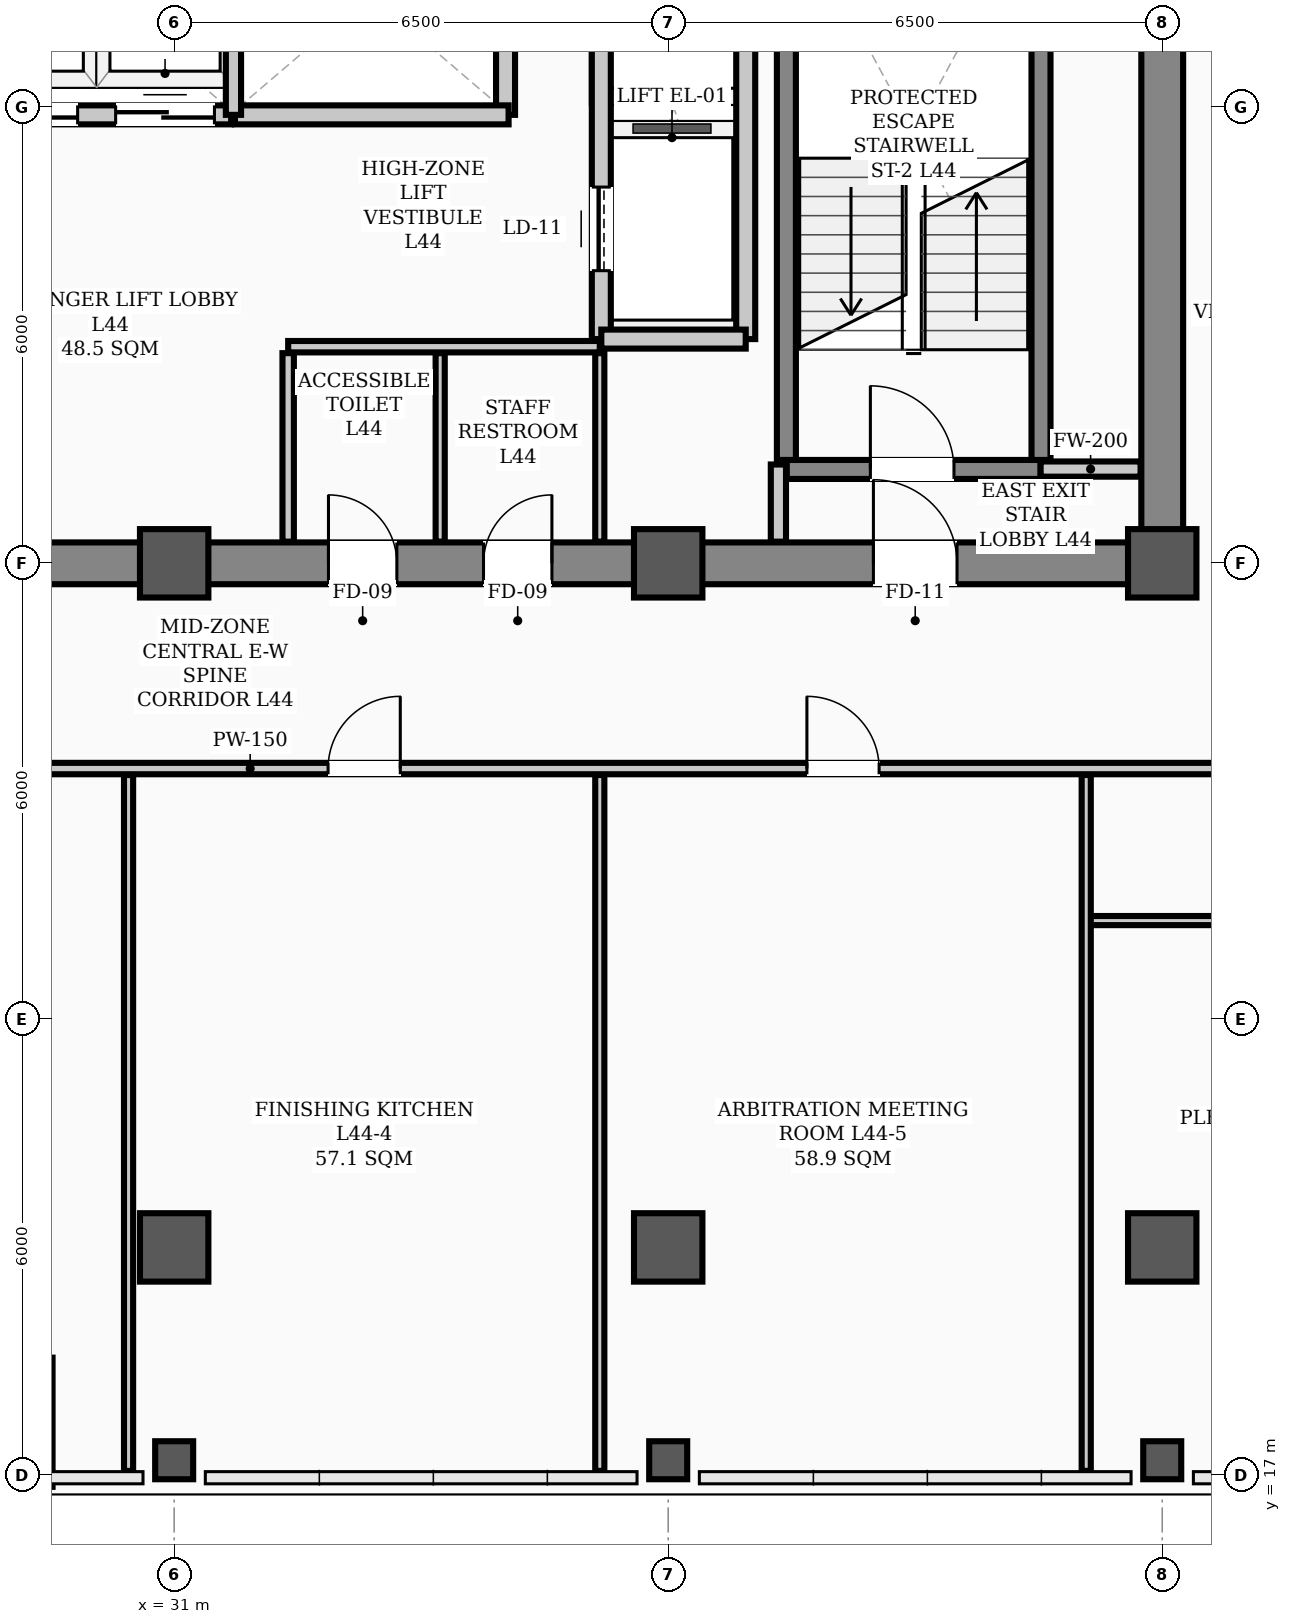
"""IFC4 building model, lengths in metres.
Left out: names, types, materials, properties, quantities, classifications, styles, units other than length and angle.
Written with IfcOpenShell. Run it as: python <this file> out.ifc"""

import sys

from ifc_helpers import new_model, si_unit, direction, frame, frame_2d, origin, origin_2d, place, context, subcontext, project, spatial, rectangle, hollow_rectangle, extrude, element, fill, save


model = new_model("IFC4")
c1 = context("Model", 3, precision=1e-05, world=origin(), true_north=direction((0.0, 1.0)))
c2 = subcontext(c1, "Body", "Model", "MODEL_VIEW")
j1 = project(units=[si_unit("LENGTHUNIT", "METRE"), si_unit("PLANEANGLEUNIT", "RADIAN")], contexts=[c1])
p1 = place(None, origin())
s1 = spatial("IfcSite", under=j1, at=p1, CompositionType="ELEMENT")
p2 = place(p1, origin())
s2 = spatial("IfcBuilding", under=s1, at=p2, CompositionType="ELEMENT")
p3 = place(p2, frame((0.0, 0.0, 177.3)))
s3 = spatial("IfcBuildingStorey", under=s2, at=p3, CompositionType="ELEMENT", Elevation=177.3)
for number, where, z_axis, x_axis in (
    (1, (31.0, 29.0, 0.0), (0.0, 0.0, 1.0), (1.0, 0.0, 0.0)),
    (2, (37.5, 29.0, 0.0), (0.0, 0.0, 1.0), (1.0, 0.0, 0.0)),
    (3, (44.0, 29.0, 0.0), (0.0, 0.0, 1.0), (1.0, 0.0, 0.0)),
    (4, (31.0, 20.0, 0.0), (0.0, 0.0, 1.0), (1.0, 0.0, 0.0)),
    (5, (37.5, 20.0, 0.0), (0.0, 0.0, 1.0), (1.0, 0.0, 0.0)),
    (6, (44.0, 20.0, 0.0), (0.0, 0.0, 1.0), (1.0, 0.0, 0.0)),
):
    element("IfcColumn", number, at=place(p3, frame(where, z_axis=z_axis, x_axis=x_axis)), inside=s3, PredefinedType="COLUMN", context=c2, shape_type="SweptSolid", body=[
        extrude(hollow_rectangle(XDim=0.9, YDim=0.9, WallThickness=0.035, InnerFilletRadius=0.017, OuterFilletRadius=0.052, at=origin_2d()), origin(), (0.0, 0.0, 1.0), 3.9),
    ])
for number, where, z_axis, x_axis in (
    (7, (31.0, 17.2, 0.0), (0.0, 0.0, 1.0), (1.0, 0.0, 0.0)),
    (8, (37.5, 17.2, 0.0), (0.0, 0.0, 1.0), (1.0, 0.0, 0.0)),
    (9, (44.0, 17.2, 0.0), (0.0, 0.0, 1.0), (1.0, 0.0, 0.0)),
):
    element("IfcColumn", number, at=place(p3, frame(where, z_axis=z_axis, x_axis=x_axis)), inside=s3, PredefinedType="COLUMN", context=c2, shape_type="SweptSolid", body=[
        extrude(hollow_rectangle(XDim=0.5, YDim=0.5, WallThickness=0.024, InnerFilletRadius=0.012, OuterFilletRadius=0.036, at=origin_2d()), origin(), (0.0, 0.0, 1.0), 3.9),
    ])
p4 = place(p3, frame((29.3, 18.55, 0.0), z_axis=(0.0, 0.0, 1.0), x_axis=(0.0, -1.0, 0.0)))
e10 = element("IfcWall", 10, at=p4, inside=s3, PredefinedType="PARAPET", context=c2, shape_type="SweptSolid", body=[
    extrude(rectangle(XDim=1.7, YDim=0.2, at=frame_2d((0.85, 0.0))), origin(), (0.0, 0.0, 1.0), 1.2),
])
p5 = place(p3, frame((13.5, 29.0, 0.0), z_axis=(0.0, 0.0, 1.0), x_axis=(1.0, 0.0, 0.0)))
e11 = element("IfcWall", 11, at=p5, inside=s3, PredefinedType="SHEAR", context=c2, shape_type="SweptSolid", body=[
    extrude(rectangle(XDim=30.5, YDim=0.55, at=frame_2d((15.25, 0.0))), origin(), (0.0, 0.0, 1.0), 3.72),
])
p6 = place(p5, frame((1.75, 0.0, 0.0)))
e12 = element("IfcOpeningElement", 12, at=p6, cuts=e11, PredefinedType="OPENING", context=c2, shape_type="SweptSolid", body=[
    extrude(rectangle(XDim=1.1, YDim=2.08, at=frame_2d((0.55, 1.04))), frame((0.0, 0.285, 0.0), z_axis=(0.0, -1.0, 0.0), x_axis=(1.0, 0.0, 0.0)), (0.0, 0.0, 1.0), 0.57),
])
p7 = place(p5, frame((26.7, 0.0, 0.0)))
e13 = element("IfcOpeningElement", 13, at=p7, cuts=e11, PredefinedType="OPENING", context=c2, shape_type="SweptSolid", body=[
    extrude(rectangle(XDim=1.1, YDim=2.08, at=frame_2d((0.55, 1.04))), frame((0.0, 0.285, 0.0), z_axis=(0.0, -1.0, 0.0), x_axis=(1.0, 0.0, 0.0)), (0.0, 0.0, 1.0), 0.57),
])
p8 = place(p5, frame((6.8, 0.0, 0.0)))
e14 = element("IfcOpeningElement", 14, at=p8, cuts=e11, PredefinedType="OPENING", context=c2, shape_type="SweptSolid", body=[
    extrude(rectangle(XDim=1.1, YDim=2.08, at=frame_2d((0.55, 1.04))), frame((0.0, 0.285, 0.0), z_axis=(0.0, -1.0, 0.0), x_axis=(1.0, 0.0, 0.0)), (0.0, 0.0, 1.0), 0.57),
])
p9 = place(p5, frame((13.2, 0.0, 0.0)))
e15 = element("IfcOpeningElement", 15, at=p9, cuts=e11, PredefinedType="OPENING", context=c2, shape_type="SweptSolid", body=[
    extrude(rectangle(XDim=1.6, YDim=2.08, at=frame_2d((0.8, 1.04))), frame((0.0, 0.285, 0.0), z_axis=(0.0, -1.0, 0.0), x_axis=(1.0, 0.0, 0.0)), (0.0, 0.0, 1.0), 0.57),
])
p10 = place(p5, frame((19.53, 0.0, 0.0)))
e16 = element("IfcOpeningElement", 16, at=p10, cuts=e11, PredefinedType="OPENING", context=c2, shape_type="SweptSolid", body=[
    extrude(rectangle(XDim=0.9, YDim=2.08, at=frame_2d((0.45, 1.04))), frame((0.0, 0.285, 0.0), z_axis=(0.0, -1.0, 0.0), x_axis=(1.0, 0.0, 0.0)), (0.0, 0.0, 1.0), 0.57),
])
p11 = place(p5, frame((21.57, 0.0, 0.0)))
e17 = element("IfcOpeningElement", 17, at=p11, cuts=e11, PredefinedType="OPENING", context=c2, shape_type="SweptSolid", body=[
    extrude(rectangle(XDim=0.9, YDim=2.08, at=frame_2d((0.45, 1.04))), frame((0.0, 0.285, 0.0), z_axis=(0.0, -1.0, 0.0), x_axis=(1.0, 0.0, 0.0)), (0.0, 0.0, 1.0), 0.57),
])
p12 = place(p3, frame((44.0, 29.35, 0.0), z_axis=(0.0, 0.0, 1.0), x_axis=(0.0, 1.0, 0.0)))
e18 = element("IfcWall", 18, at=p12, inside=s3, PredefinedType="SHEAR", context=c2, shape_type="SweptSolid", body=[
    extrude(rectangle(XDim=8.6, YDim=0.55, at=frame_2d((4.3, 0.0))), origin(), (0.0, 0.0, 1.0), 3.72),
])
p13 = place(p3, frame((39.06, 30.235, 0.0), z_axis=(0.0, 0.0, 1.0), x_axis=(1.0, 0.0, 0.0)))
e19 = element("IfcWall", 19, at=p13, inside=s3, PredefinedType="STANDARD", context=c2, shape_type="SweptSolid", body=[
    extrude(rectangle(XDim=3.34, YDim=0.25, at=frame_2d((1.67, 0.0))), origin(), (0.0, 0.0, 1.0), 3.72),
])
p14 = place(p13, frame((1.1, 0.0, 0.0)))
e20 = element("IfcOpeningElement", 20, at=p14, cuts=e19, PredefinedType="OPENING", context=c2, shape_type="SweptSolid", body=[
    extrude(rectangle(XDim=1.1, YDim=2.08, at=frame_2d((0.55, 1.04))), frame((0.0, 0.135, 0.0), z_axis=(0.0, -1.0, 0.0), x_axis=(1.0, 0.0, 0.0)), (0.0, 0.0, 1.0), 0.27),
])
for number, where, z_axis, x_axis in (
    (21, (39.055, 30.36, 0.0), (0.0, 0.0, 1.0), (0.0, 1.0, 0.0)),
    (22, (42.405, 30.36, 0.0), (0.0, 0.0, 1.0), (0.0, 1.0, 0.0)),
):
    element("IfcWall", number, at=place(p3, frame(where, z_axis=z_axis, x_axis=x_axis)), inside=s3, PredefinedType="STANDARD", context=c2, shape_type="SweptSolid", body=[
        extrude(rectangle(XDim=7.184, YDim=0.25, at=frame_2d((3.592, 0.0))), origin(), (0.0, 0.0, 1.0), 3.72),
    ])
p15 = place(p3, frame((36.62, 31.95, 0.0), z_axis=(0.0, 0.0, 1.0), x_axis=(0.0, 1.0, 0.0)))
e23 = element("IfcWall", 23, at=p15, inside=s3, PredefinedType="STANDARD", context=c2, shape_type="SweptSolid", body=[
    extrude(rectangle(XDim=6.0, YDim=0.25, at=frame_2d((3.0, 0.0))), origin(), (0.0, 0.0, 1.0), 3.35),
])
p16 = place(p15, frame((0.9, 0.0, 0.0)))
e24 = element("IfcOpeningElement", 24, at=p16, cuts=e23, PredefinedType="OPENING", context=c2, shape_type="SweptSolid", body=[
    extrude(rectangle(XDim=1.1, YDim=2.08, at=frame_2d((0.55, 1.04))), frame((0.0, 0.135, 0.0), z_axis=(0.0, -1.0, 0.0), x_axis=(1.0, 0.0, 0.0)), (0.0, 0.0, 1.0), 0.27),
])
p17 = place(p15, frame((4.0, 0.0, 0.0)))
e25 = element("IfcOpeningElement", 25, at=p17, cuts=e23, PredefinedType="OPENING", context=c2, shape_type="SweptSolid", body=[
    extrude(rectangle(XDim=1.1, YDim=2.08, at=frame_2d((0.55, 1.04))), frame((0.0, 0.135, 0.0), z_axis=(0.0, -1.0, 0.0), x_axis=(1.0, 0.0, 0.0)), (0.0, 0.0, 1.0), 0.27),
])
p18 = place(p3, frame((38.52, 31.95, 0.0), z_axis=(0.0, 0.0, 1.0), x_axis=(0.0, 1.0, 0.0)))
e26 = element("IfcWall", 26, at=p18, inside=s3, PredefinedType="STANDARD", context=c2, shape_type="SweptSolid", body=[
    extrude(rectangle(XDim=6.0, YDim=0.25, at=frame_2d((3.0, 0.0))), origin(), (0.0, 0.0, 1.0), 3.35),
])
p19 = place(p3, frame((36.62, 31.95, 0.0), z_axis=(0.0, 0.0, 1.0), x_axis=(1.0, 0.0, 0.0)))
e27 = element("IfcWall", 27, at=p19, inside=s3, PredefinedType="STANDARD", context=c2, shape_type="SweptSolid", body=[
    extrude(rectangle(XDim=1.9, YDim=0.25, at=frame_2d((0.95, 0.0))), origin(), (0.0, 0.0, 1.0), 3.48),
])
p20 = place(p3, frame((35.36, 34.9, 0.0), z_axis=(0.0, 0.0, 1.0), x_axis=(0.0, 1.0, 0.0)))
e28 = element("IfcWall", 28, at=p20, inside=s3, PredefinedType="STANDARD", context=c2, shape_type="SweptSolid", body=[
    extrude(rectangle(XDim=3.05, YDim=0.25, at=frame_2d((1.525, 0.0))), origin(), (0.0, 0.0, 1.0), 3.35),
])
p21 = place(p3, frame((28.2, 34.9, 0.0), z_axis=(0.0, 0.0, 1.0), x_axis=(1.0, 0.0, 0.0)))
e29 = element("IfcWall", 29, at=p21, inside=s3, PredefinedType="STANDARD", context=c2, shape_type="SweptSolid", body=[
    extrude(rectangle(XDim=3.55, YDim=0.25, at=frame_2d((1.775, 0.0))), origin(), (0.0, 0.0, 1.0), 3.72),
])
p22 = place(p21, frame((0.23, 0.0, 0.0)))
e30 = element("IfcOpeningElement", 30, at=p22, cuts=e29, PredefinedType="OPENING", context=c2, shape_type="SweptSolid", body=[
    extrude(rectangle(XDim=1.3, YDim=2.08, at=frame_2d((0.65, 1.04))), frame((0.0, 0.135, 0.0), z_axis=(0.0, -1.0, 0.0), x_axis=(1.0, 0.0, 0.0)), (0.0, 0.0, 1.0), 0.27),
])
p23 = place(p21, frame((2.03, 0.0, 0.0)))
e31 = element("IfcOpeningElement", 31, at=p23, cuts=e29, PredefinedType="OPENING", context=c2, shape_type="SweptSolid", body=[
    extrude(rectangle(XDim=1.3, YDim=2.08, at=frame_2d((0.65, 1.04))), frame((0.0, 0.135, 0.0), z_axis=(0.0, -1.0, 0.0), x_axis=(1.0, 0.0, 0.0)), (0.0, 0.0, 1.0), 0.27),
])
p24 = place(p3, frame((31.8, 34.9, 0.0), z_axis=(0.0, 0.0, 1.0), x_axis=(1.0, 0.0, 0.0)))
e32 = element("IfcWall", 32, at=p24, inside=s3, PredefinedType="STANDARD", context=c2, shape_type="SweptSolid", body=[
    extrude(rectangle(XDim=3.6, YDim=0.25, at=frame_2d((1.8, 0.0))), origin(), (0.0, 0.0, 1.0), 3.72),
])
p25 = place(p3, frame((42.4, 30.24, 0.0), z_axis=(0.0, 0.0, 1.0), x_axis=(1.0, 0.0, 0.0)))
e33 = element("IfcWall", 33, at=p25, inside=s3, PredefinedType="STANDARD", context=c2, shape_type="SweptSolid", body=[
    extrude(rectangle(XDim=1.315, YDim=0.2, at=frame_2d((0.658, 0.0))), origin(), (0.0, 0.0, 1.0), 3.2),
])
p26 = place(p3, frame((32.5, 31.85, 0.0), z_axis=(0.0, 0.0, 1.0), x_axis=(1.0, 0.0, 0.0)))
e34 = element("IfcWall", 34, at=p26, inside=s3, PredefinedType="PARTITIONING", context=c2, shape_type="SweptSolid", body=[
    extrude(rectangle(XDim=4.1, YDim=0.15, at=frame_2d((2.05, 0.0))), origin(), (0.0, 0.0, 1.0), 3.72),
])
p27 = place(p3, frame((10.31, 26.3, 0.0), z_axis=(0.0, 0.0, 1.0), x_axis=(1.0, 0.0, 0.0)))
e35 = element("IfcWall", 35, at=p27, inside=s3, PredefinedType="PARTITIONING", context=c2, shape_type="SweptSolid", body=[
    extrude(rectangle(XDim=43.38, YDim=0.15, at=frame_2d((21.69, 0.0))), origin(), (0.0, 0.0, 1.0), 3.2),
])
p28 = place(p27, frame((0.575, 0.0, 0.0)))
e36 = element("IfcOpeningElement", 36, at=p28, cuts=e35, PredefinedType="OPENING", context=c2, shape_type="SweptSolid", body=[
    extrude(rectangle(XDim=0.95, YDim=2.08, at=frame_2d((0.475, 1.04))), frame((0.0, 0.085, 0.0), z_axis=(0.0, -1.0, 0.0), x_axis=(1.0, 0.0, 0.0)), (0.0, 0.0, 1.0), 0.17),
])
p29 = place(p27, frame((9.415, 0.0, 0.0)))
e37 = element("IfcOpeningElement", 37, at=p29, cuts=e35, PredefinedType="OPENING", context=c2, shape_type="SweptSolid", body=[
    extrude(rectangle(XDim=0.95, YDim=2.08, at=frame_2d((0.475, 1.04))), frame((0.0, 0.085, 0.0), z_axis=(0.0, -1.0, 0.0), x_axis=(1.0, 0.0, 0.0)), (0.0, 0.0, 1.0), 0.17),
])
p30 = place(p27, frame((16.115, 0.0, 0.0)))
e38 = element("IfcOpeningElement", 38, at=p30, cuts=e35, PredefinedType="OPENING", context=c2, shape_type="SweptSolid", body=[
    extrude(rectangle(XDim=0.95, YDim=2.08, at=frame_2d((0.475, 1.04))), frame((0.0, 0.085, 0.0), z_axis=(0.0, -1.0, 0.0), x_axis=(1.0, 0.0, 0.0)), (0.0, 0.0, 1.0), 0.17),
])
p31 = place(p27, frame((22.715, 0.0, 0.0)))
e39 = element("IfcOpeningElement", 39, at=p31, cuts=e35, PredefinedType="OPENING", context=c2, shape_type="SweptSolid", body=[
    extrude(rectangle(XDim=0.95, YDim=2.08, at=frame_2d((0.475, 1.04))), frame((0.0, 0.085, 0.0), z_axis=(0.0, -1.0, 0.0), x_axis=(1.0, 0.0, 0.0)), (0.0, 0.0, 1.0), 0.17),
])
p32 = place(p27, frame((29.015, 0.0, 0.0)))
e40 = element("IfcOpeningElement", 40, at=p32, cuts=e35, PredefinedType="OPENING", context=c2, shape_type="SweptSolid", body=[
    extrude(rectangle(XDim=0.95, YDim=2.08, at=frame_2d((0.475, 1.04))), frame((0.0, 0.085, 0.0), z_axis=(0.0, -1.0, 0.0), x_axis=(1.0, 0.0, 0.0)), (0.0, 0.0, 1.0), 0.17),
])
p33 = place(p27, frame((34.79, 0.0, 0.0)))
e41 = element("IfcOpeningElement", 41, at=p33, cuts=e35, PredefinedType="OPENING", context=c2, shape_type="SweptSolid", body=[
    extrude(rectangle(XDim=0.95, YDim=2.08, at=frame_2d((0.475, 1.04))), frame((0.0, 0.085, 0.0), z_axis=(0.0, -1.0, 0.0), x_axis=(1.0, 0.0, 0.0)), (0.0, 0.0, 1.0), 0.17),
])
p34 = place(p3, frame((43.0, 24.3, 0.0), z_axis=(0.0, 0.0, 1.0), x_axis=(1.0, 0.0, 0.0)))
e42 = element("IfcWall", 42, at=p34, inside=s3, PredefinedType="PARTITIONING", context=c2, shape_type="SweptSolid", body=[
    extrude(rectangle(XDim=10.69, YDim=0.12, at=frame_2d((5.345, 0.0))), origin(), (0.0, 0.0, 1.0), 3.2),
])
p35 = place(p34, frame((4.87, 0.0, 0.0)))
e43 = element("IfcOpeningElement", 43, at=p35, cuts=e42, PredefinedType="OPENING", context=c2, shape_type="SweptSolid", body=[
    extrude(rectangle(XDim=0.95, YDim=2.08, at=frame_2d((0.475, 1.04))), frame((0.0, 0.07, 0.0), z_axis=(0.0, -1.0, 0.0), x_axis=(1.0, 0.0, 0.0)), (0.0, 0.0, 1.0), 0.14),
])
p36 = place(p3, frame((38.95, 29.285, 0.0), z_axis=(0.0, 0.0, 1.0), x_axis=(0.0, 1.0, 0.0)))
e44 = element("IfcWall", 44, at=p36, inside=s3, PredefinedType="STANDARD", context=c2, shape_type="SweptSolid", body=[
    extrude(rectangle(XDim=1.015, YDim=0.2, at=frame_2d((0.508, 0.0))), origin(), (0.0, 0.0, 1.0), 3.35),
])
p37 = place(p3, frame((32.5, 29.285, 0.0), z_axis=(0.0, 0.0, 1.0), x_axis=(0.0, 1.0, 0.0)))
e45 = element("IfcWall", 45, at=p37, inside=s3, PredefinedType="PARTITIONING", context=c2, shape_type="SweptSolid", body=[
    extrude(rectangle(XDim=2.48, YDim=0.15, at=frame_2d((1.24, 0.0))), origin(), (0.0, 0.0, 1.0), 3.35),
])
for number, where, z_axis, x_axis in (
    (46, (36.6, 29.285, 0.0), (0.0, 0.0, 1.0), (0.0, 1.0, 0.0)),
    (47, (34.5, 29.285, 0.0), (0.0, 0.0, 1.0), (0.0, 1.0, 0.0)),
):
    element("IfcWall", number, at=place(p3, frame(where, z_axis=z_axis, x_axis=x_axis)), inside=s3, PredefinedType="PARTITIONING", context=c2, shape_type="SweptSolid", body=[
        extrude(rectangle(XDim=2.48, YDim=0.12, at=frame_2d((1.24, 0.0))), origin(), (0.0, 0.0, 1.0), 3.35),
    ])
for number, where, z_axis, x_axis in (
    (48, (30.4, 17.06, 0.0), (0.0, 0.0, 1.0), (0.0, 1.0, 0.0)),
    (49, (36.6, 17.06, 0.0), (0.0, 0.0, 1.0), (0.0, 1.0, 0.0)),
    (50, (43.0, 17.06, 0.0), (0.0, 0.0, 1.0), (0.0, 1.0, 0.0)),
):
    element("IfcWall", number, at=place(p3, frame(where, z_axis=z_axis, x_axis=x_axis)), inside=s3, PredefinedType="PARTITIONING", context=c2, shape_type="SweptSolid", body=[
        extrude(rectangle(XDim=9.155, YDim=0.12, at=frame_2d((4.578, 0.0))), origin(), (0.0, 0.0, 1.0), 3.1),
    ])
p38 = place(p3, frame((31.78, 34.9, 0.0), z_axis=(0.0, 0.0, 1.0), x_axis=(0.0, 1.0, 0.0)))
e51 = element("IfcWall", 51, at=p38, inside=s3, PredefinedType="STANDARD", context=c2, shape_type="SweptSolid", body=[
    extrude(rectangle(XDim=3.12, YDim=0.2, at=frame_2d((1.56, 0.0))), origin(), (0.0, 0.0, 1.0), 3.35),
])
p39 = place(p14, origin())
e52 = element("IfcDoor", 52, at=p39, inside=s3, OperationType="SINGLE_SWING_LEFT", PredefinedType="DOOR", context=c2, shape_type="SweptSolid", body=[
    extrude(rectangle(XDim=1.1, YDim=2.08, at=frame_2d((0.55, 1.04))), frame((0.0, 0.025, 0.0), z_axis=(0.0, -1.0, 0.0), x_axis=(1.0, 0.0, 0.0)), (0.0, 0.0, 1.0), 0.05),
])
fill(e20, e52)
p40 = place(p7, origin())
e53 = element("IfcDoor", 53, at=p40, inside=s3, OperationType="SINGLE_SWING_LEFT", PredefinedType="DOOR", context=c2, shape_type="SweptSolid", body=[
    extrude(rectangle(XDim=1.1, YDim=2.08, at=frame_2d((0.55, 1.04))), frame((0.0, 0.025, 0.0), z_axis=(0.0, -1.0, 0.0), x_axis=(1.0, 0.0, 0.0)), (0.0, 0.0, 1.0), 0.05),
])
fill(e13, e53)
p41 = place(p10, origin())
e54 = element("IfcDoor", 54, at=p41, inside=s3, OperationType="SINGLE_SWING_LEFT", PredefinedType="DOOR", context=c2, shape_type="SweptSolid", body=[
    extrude(rectangle(XDim=0.9, YDim=2.08, at=frame_2d((0.45, 1.04))), frame((0.0, 0.025, 0.0), z_axis=(0.0, -1.0, 0.0), x_axis=(1.0, 0.0, 0.0)), (0.0, 0.0, 1.0), 0.05),
])
fill(e16, e54)
p42 = place(p11, origin())
e55 = element("IfcDoor", 55, at=p42, inside=s3, OperationType="SINGLE_SWING_RIGHT", PredefinedType="DOOR", context=c2, shape_type="SweptSolid", body=[
    extrude(rectangle(XDim=0.9, YDim=2.08, at=frame_2d((0.45, 1.04))), frame((0.0, 0.025, 0.0), z_axis=(0.0, -1.0, 0.0), x_axis=(1.0, 0.0, 0.0)), (0.0, 0.0, 1.0), 0.05),
])
fill(e17, e55)
p43 = place(p31, origin())
e56 = element("IfcDoor", 56, at=p43, inside=s3, OperationType="SINGLE_SWING_RIGHT", PredefinedType="DOOR", context=c2, shape_type="SweptSolid", body=[
    extrude(rectangle(XDim=0.95, YDim=2.08, at=frame_2d((0.475, 1.04))), frame((0.0, 0.025, 0.0), z_axis=(0.0, -1.0, 0.0), x_axis=(1.0, 0.0, 0.0)), (0.0, 0.0, 1.0), 0.05),
])
fill(e39, e56)
p44 = place(p32, origin())
e57 = element("IfcDoor", 57, at=p44, inside=s3, OperationType="SINGLE_SWING_LEFT", PredefinedType="DOOR", context=c2, shape_type="SweptSolid", body=[
    extrude(rectangle(XDim=0.95, YDim=2.08, at=frame_2d((0.475, 1.04))), frame((0.0, 0.025, 0.0), z_axis=(0.0, -1.0, 0.0), x_axis=(1.0, 0.0, 0.0)), (0.0, 0.0, 1.0), 0.05),
])
fill(e40, e57)
p45 = place(p16, origin())
e58 = element("IfcDoor", 58, at=p45, inside=s3, OperationType="SLIDING_TO_LEFT", PredefinedType="DOOR", context=c2, shape_type="SweptSolid", body=[
    extrude(rectangle(XDim=1.1, YDim=2.08, at=frame_2d((0.55, 1.04))), frame((0.0, 0.025, 0.0), z_axis=(0.0, -1.0, 0.0), x_axis=(1.0, 0.0, 0.0)), (0.0, 0.0, 1.0), 0.05),
])
fill(e24, e58)
p46 = place(p22, origin())
e59 = element("IfcDoor", 59, at=p46, inside=s3, OperationType="DOUBLE_DOOR_SLIDING", PredefinedType="DOOR", context=c2, shape_type="SweptSolid", body=[
    extrude(rectangle(XDim=1.3, YDim=2.08, at=frame_2d((0.65, 1.04))), frame((0.0, 0.025, 0.0), z_axis=(0.0, -1.0, 0.0), x_axis=(1.0, 0.0, 0.0)), (0.0, 0.0, 1.0), 0.05),
])
fill(e30, e59)
p47 = place(p23, origin())
e60 = element("IfcDoor", 60, at=p47, inside=s3, OperationType="DOUBLE_DOOR_SLIDING", PredefinedType="DOOR", context=c2, shape_type="SweptSolid", body=[
    extrude(rectangle(XDim=1.3, YDim=2.08, at=frame_2d((0.65, 1.04))), frame((0.0, 0.025, 0.0), z_axis=(0.0, -1.0, 0.0), x_axis=(1.0, 0.0, 0.0)), (0.0, 0.0, 1.0), 0.05),
])
fill(e31, e60)
save(model, sys.argv[1])
